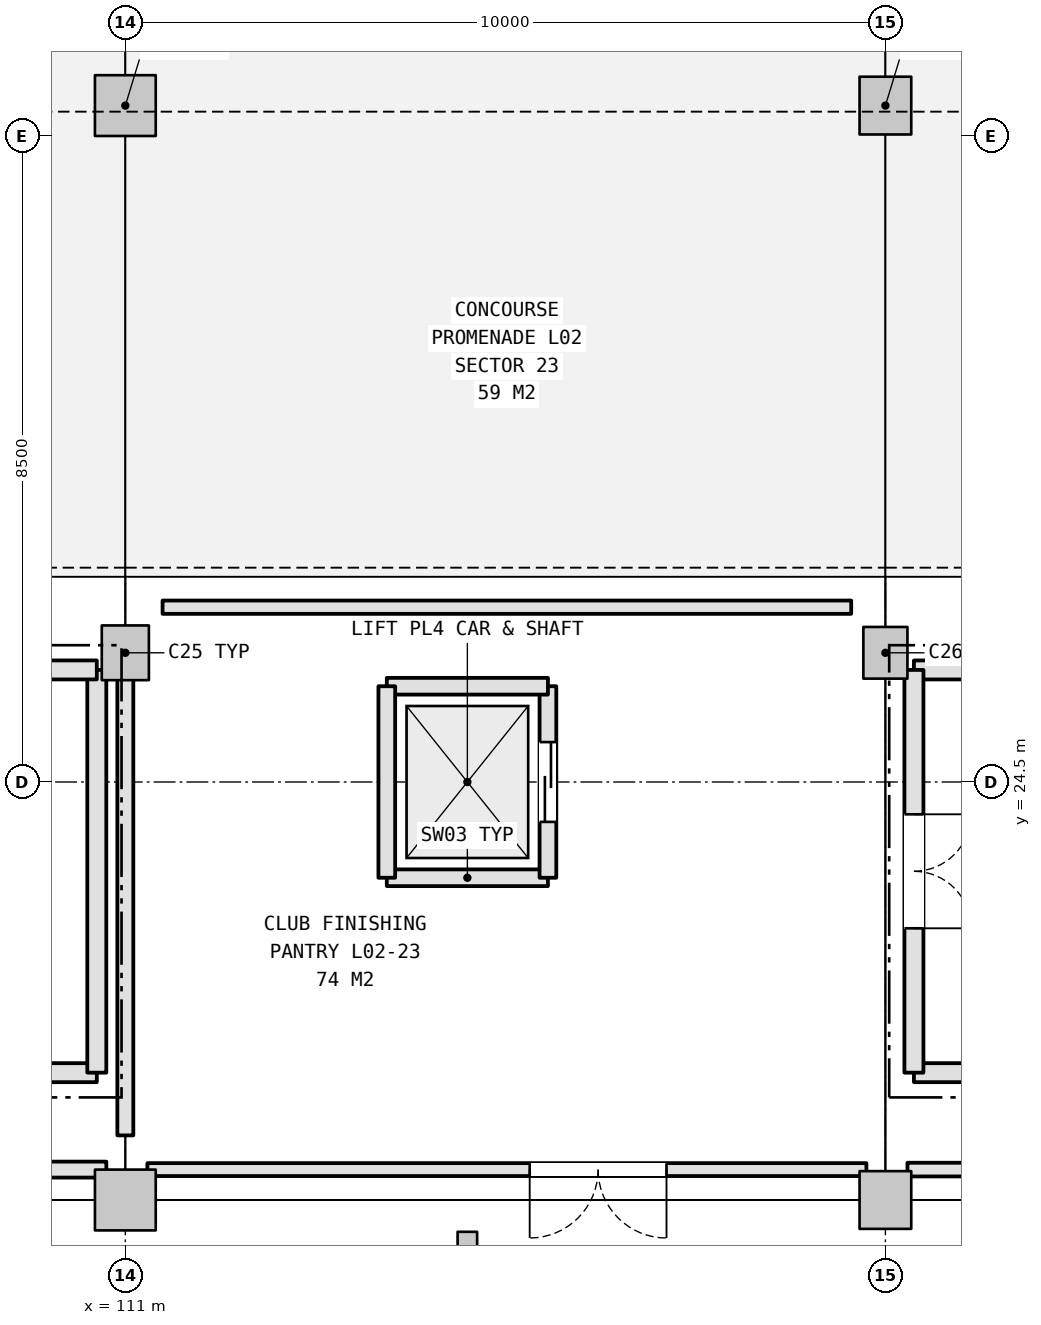
"""IFC4 building model, lengths in metres.
Left out: names, types, materials, properties, quantities, classifications, styles, units other than length and angle.
Written with IfcOpenShell. Run it as: python <this file> out.ifc"""

import sys

from ifc_helpers import new_model, si_unit, direction, frame, frame_2d, origin, origin_2d, place, context, subcontext, project, spatial, rectangle, i_section, extrude, element, fill, save


model = new_model("IFC4")
c1 = context("Model", 3, precision=1e-05, world=origin(), true_north=direction((0.0, 1.0)))
c2 = subcontext(c1, "Body", "Model", "MODEL_VIEW")
j1 = project(units=[si_unit("LENGTHUNIT", "METRE"), si_unit("PLANEANGLEUNIT", "RADIAN")], contexts=[c1])
p1 = place(None, origin())
s1 = spatial("IfcSite", under=j1, at=p1, CompositionType="ELEMENT")
p2 = place(p1, origin())
s2 = spatial("IfcBuilding", under=s1, at=p2, CompositionType="ELEMENT")
p3 = place(p2, frame((0.0, 0.0, 10.8)))
s3 = spatial("IfcBuildingStorey", under=s2, at=p3, CompositionType="ELEMENT", Elevation=10.8)
p4 = place(p3, frame((111.0, 33.4, 0.0), z_axis=(0.0, 0.0, 1.0), x_axis=(1.0, 0.0, 0.0)))
e1 = element("IfcColumn", 1, at=p4, inside=s3, PredefinedType="COLUMN", context=c2, shape_type="SweptSolid", body=[
    extrude(rectangle(XDim=0.8, YDim=0.8, at=origin_2d()), origin(), (0.0, 0.0, 1.0), 5.4),
])
p5 = place(p3, frame((111.0, 26.2, 0.0), z_axis=(0.0, 0.0, 1.0), x_axis=(1.0, 0.0, 0.0)))
e2 = element("IfcColumn", 2, at=p5, inside=s3, PredefinedType="COLUMN", context=c2, shape_type="SweptSolid", body=[
    extrude(rectangle(XDim=0.62, YDim=0.72, at=origin_2d()), origin(), (0.0, 0.0, 1.0), 5.4),
])
p6 = place(p3, frame((111.0, 19.0, 0.0), z_axis=(0.0, 0.0, 1.0), x_axis=(1.0, 0.0, 0.0)))
e3 = element("IfcColumn", 3, at=p6, inside=s3, PredefinedType="COLUMN", context=c2, shape_type="SweptSolid", body=[
    extrude(rectangle(XDim=0.8, YDim=0.8, at=origin_2d()), origin(), (0.0, 0.0, 1.0), 5.4),
])
p7 = place(p3, frame((121.0, 33.4, 0.0), z_axis=(0.0, 0.0, 1.0), x_axis=(1.0, 0.0, 0.0)))
e4 = element("IfcColumn", 4, at=p7, inside=s3, PredefinedType="COLUMN", context=c2, shape_type="SweptSolid", body=[
    extrude(rectangle(XDim=0.68, YDim=0.76, at=origin_2d()), origin(), (0.0, 0.0, 1.0), 5.4),
])
p8 = place(p3, frame((121.0, 26.2, 0.0), z_axis=(0.0, 0.0, 1.0), x_axis=(1.0, 0.0, 0.0)))
e5 = element("IfcColumn", 5, at=p8, inside=s3, PredefinedType="COLUMN", context=c2, shape_type="SweptSolid", body=[
    extrude(rectangle(XDim=0.58, YDim=0.68, at=origin_2d()), origin(), (0.0, 0.0, 1.0), 5.4),
])
p9 = place(p3, frame((121.0, 19.0, 0.0), z_axis=(0.0, 0.0, 1.0), x_axis=(1.0, 0.0, 0.0)))
e6 = element("IfcColumn", 6, at=p9, inside=s3, PredefinedType="COLUMN", context=c2, shape_type="SweptSolid", body=[
    extrude(rectangle(XDim=0.68, YDim=0.76, at=origin_2d()), origin(), (0.0, 0.0, 1.0), 5.4),
])
p10 = place(p3, frame((115.5, 18.4, 0.0), z_axis=(0.0, 0.0, 1.0), x_axis=(1.0, 0.0, 0.0)))
e7 = element("IfcColumn", 7, at=p10, inside=s3, PredefinedType="COLUMN", context=c2, shape_type="SweptSolid", body=[
    extrude(i_section(OverallWidth=0.257, OverallDepth=0.363, WebThickness=0.013, FlangeThickness=0.022, FilletRadius=0.015, at=origin_2d()), origin(), (0.0, 0.0, 1.0), 5.4),
])
for number, where, z_axis, x_axis in (
    (8, (121.375, 20.675, 0.0), (0.0, 0.0, 1.0), (1.0, 0.0, 0.0)),
    (9, (130.625, 25.975, 0.0), (0.0, 0.0, 1.0), (-1.0, 0.0, 0.0)),
):
    element("IfcWall", number, at=place(p3, frame(where, z_axis=z_axis, x_axis=x_axis)), inside=s3, PredefinedType="SHEAR", context=c2, shape_type="SweptSolid", body=[
        extrude(rectangle(XDim=9.249, YDim=0.25, at=frame_2d((4.625, 0.0))), origin(), (0.0, 0.0, 1.0), 5.15),
    ])
p11 = place(p3, frame((121.375, 25.975, 0.0), z_axis=(0.0, 0.0, 1.0), x_axis=(0.0, -1.0, 0.0)))
e10 = element("IfcWall", 10, at=p11, inside=s3, PredefinedType="SHEAR", context=c2, shape_type="SweptSolid", body=[
    extrude(rectangle(XDim=5.299, YDim=0.25, at=frame_2d((2.65, 0.0))), origin(), (0.0, 0.0, 1.0), 5.15),
])
p12 = place(p11, frame((1.9, 0.0, 0.0)))
e11 = element("IfcOpeningElement", 11, at=p12, cuts=e10, PredefinedType="OPENING", context=c2, shape_type="SweptSolid", body=[
    extrude(rectangle(XDim=1.5, YDim=2.2, at=frame_2d((0.75, 1.1))), frame((0.0, 0.135, 0.0), z_axis=(0.0, -1.0, 0.0), x_axis=(1.0, 0.0, 0.0)), (0.0, 0.0, 1.0), 0.27),
])
p13 = place(p3, frame((101.375, 20.675, 0.0), z_axis=(0.0, 0.0, 1.0), x_axis=(1.0, 0.0, 0.0)))
e12 = element("IfcWall", 12, at=p13, inside=s3, PredefinedType="SHEAR", context=c2, shape_type="SweptSolid", body=[
    extrude(rectangle(XDim=9.249, YDim=0.25, at=frame_2d((4.625, 0.0))), origin(), (0.0, 0.0, 1.0), 5.15),
])
p14 = place(p3, frame((110.625, 20.675, 0.0), z_axis=(0.0, 0.0, 1.0), x_axis=(0.0, 1.0, 0.0)))
e13 = element("IfcWall", 13, at=p14, inside=s3, PredefinedType="SHEAR", context=c2, shape_type="SweptSolid", body=[
    extrude(rectangle(XDim=5.299, YDim=0.25, at=frame_2d((2.65, 0.0))), origin(), (0.0, 0.0, 1.0), 5.15),
])
p15 = place(p3, frame((110.625, 25.975, 0.0), z_axis=(0.0, 0.0, 1.0), x_axis=(-1.0, 0.0, 0.0)))
e14 = element("IfcWall", 14, at=p15, inside=s3, PredefinedType="SHEAR", context=c2, shape_type="SweptSolid", body=[
    extrude(rectangle(XDim=9.249, YDim=0.25, at=frame_2d((4.625, 0.0))), origin(), (0.0, 0.0, 1.0), 5.15),
])
p16 = place(p3, frame((114.44, 23.24, 0.0), z_axis=(0.0, 0.0, 1.0), x_axis=(1.0, 0.0, 0.0)))
e15 = element("IfcWall", 15, at=p16, inside=s3, PredefinedType="SHEAR", context=c2, shape_type="SweptSolid", body=[
    extrude(rectangle(XDim=2.12, YDim=0.22, at=frame_2d((1.06, 0.0))), origin(), (0.0, 0.0, 1.0), 5.15),
])
p17 = place(p3, frame((116.56, 23.24, 0.0), z_axis=(0.0, 0.0, 1.0), x_axis=(0.0, 1.0, 0.0)))
e16 = element("IfcWall", 16, at=p17, inside=s3, PredefinedType="SHEAR", context=c2, shape_type="SweptSolid", body=[
    extrude(rectangle(XDim=2.52, YDim=0.22, at=frame_2d((1.26, 0.0))), origin(), (0.0, 0.0, 1.0), 5.15),
])
p18 = place(p17, frame((0.735, 0.0, 0.0)))
e17 = element("IfcOpeningElement", 17, at=p18, cuts=e16, PredefinedType="OPENING", context=c2, shape_type="SweptSolid", body=[
    extrude(rectangle(XDim=1.05, YDim=2.15, at=frame_2d((0.525, 1.075))), frame((0.0, 0.12, 0.0), z_axis=(0.0, -1.0, 0.0), x_axis=(1.0, 0.0, 0.0)), (0.0, 0.0, 1.0), 0.24),
])
p19 = place(p3, frame((116.56, 25.76, 0.0), z_axis=(0.0, 0.0, 1.0), x_axis=(-1.0, 0.0, 0.0)))
e18 = element("IfcWall", 18, at=p19, inside=s3, PredefinedType="SHEAR", context=c2, shape_type="SweptSolid", body=[
    extrude(rectangle(XDim=2.12, YDim=0.22, at=frame_2d((1.06, 0.0))), origin(), (0.0, 0.0, 1.0), 5.15),
])
p20 = place(p3, frame((114.44, 25.76, 0.0), z_axis=(0.0, 0.0, 1.0), x_axis=(0.0, -1.0, 0.0)))
e19 = element("IfcWall", 19, at=p20, inside=s3, PredefinedType="SHEAR", context=c2, shape_type="SweptSolid", body=[
    extrude(rectangle(XDim=2.52, YDim=0.22, at=frame_2d((1.26, 0.0))), origin(), (0.0, 0.0, 1.0), 5.15),
])
p21 = place(p3, frame((110.75, 19.4, 0.0), z_axis=(0.0, 0.0, 1.0), x_axis=(-1.0, 0.0, 0.0)))
e20 = element("IfcWall", 20, at=p21, inside=s3, PredefinedType="PLUMBINGWALL", context=c2, shape_type="SweptSolid", body=[
    extrude(rectangle(XDim=9.46, YDim=0.21, at=frame_2d((4.73, 0.0))), origin(), (0.0, 0.0, 1.0), 4.215),
])
p22 = place(p21, frame((7.47, 0.0, 0.0)))
e21 = element("IfcOpeningElement", 21, at=p22, cuts=e20, PredefinedType="OPENING", context=c2, shape_type="SweptSolid", body=[
    extrude(rectangle(XDim=0.92, YDim=2.1, at=frame_2d((0.46, 1.05))), frame((0.0, 0.115, 0.0), z_axis=(0.0, -1.0, 0.0), x_axis=(1.0, 0.0, 0.0)), (0.0, 0.0, 1.0), 0.23),
])
p23 = place(p3, frame((111.0, 26.35, 0.0), z_axis=(0.0, 0.0, 1.0), x_axis=(0.0, -1.0, 0.0)))
e22 = element("IfcWall", 22, at=p23, inside=s3, PredefinedType="PLUMBINGWALL", context=c2, shape_type="SweptSolid", body=[
    extrude(rectangle(XDim=6.5, YDim=0.21, at=frame_2d((3.25, 0.0))), origin(), (0.0, 0.0, 1.0), 4.255),
])
p24 = place(p3, frame((120.75, 19.4, 0.0), z_axis=(0.0, 0.0, 1.0), x_axis=(-1.0, 0.0, 0.0)))
e23 = element("IfcWall", 23, at=p24, inside=s3, PredefinedType="PARTITIONING", context=c2, shape_type="SweptSolid", body=[
    extrude(rectangle(XDim=9.46, YDim=0.17, at=frame_2d((4.73, 0.0))), origin(), (0.0, 0.0, 1.0), 4.255),
])
p25 = place(p24, frame((2.63, 0.0, 0.0)))
e24 = element("IfcOpeningElement", 24, at=p25, cuts=e23, PredefinedType="OPENING", context=c2, shape_type="SweptSolid", body=[
    extrude(rectangle(XDim=1.8, YDim=2.2, at=frame_2d((0.9, 1.1))), frame((0.0, 0.095, 0.0), z_axis=(0.0, -1.0, 0.0), x_axis=(1.0, 0.0, 0.0)), (0.0, 0.0, 1.0), 0.19),
])
p26 = place(p3, frame((111.49, 26.8, 0.0), z_axis=(0.0, 0.0, 1.0), x_axis=(1.0, 0.0, 0.0)))
e25 = element("IfcWall", 25, at=p26, inside=s3, PredefinedType="PARTITIONING", context=c2, shape_type="SweptSolid", body=[
    extrude(rectangle(XDim=9.06, YDim=0.175, at=frame_2d((4.53, 0.0))), origin(), (0.0, 0.0, 1.0), 5.12),
])
p27 = place(p3, frame((130.75, 19.4, 0.0), z_axis=(0.0, 0.0, 1.0), x_axis=(-1.0, 0.0, 0.0)))
e26 = element("IfcWall", 26, at=p27, inside=s3, PredefinedType="PARTITIONING", context=c2, shape_type="SweptSolid", body=[
    extrude(rectangle(XDim=9.46, YDim=0.18, at=frame_2d((4.73, 0.0))), origin(), (0.0, 0.0, 1.0), 4.215),
])
p28 = place(p27, frame((7.455, 0.0, 0.0)))
e27 = element("IfcOpeningElement", 27, at=p28, cuts=e26, PredefinedType="OPENING", context=c2, shape_type="SweptSolid", body=[
    extrude(rectangle(XDim=0.95, YDim=2.15, at=frame_2d((0.475, 1.075))), frame((0.0, 0.1, 0.0), z_axis=(0.0, -1.0, 0.0), x_axis=(1.0, 0.0, 0.0)), (0.0, 0.0, 1.0), 0.2),
])
p29 = place(p12, origin())
e28 = element("IfcDoor", 28, at=p29, inside=s3, OperationType="DOUBLE_DOOR_SINGLE_SWING", PredefinedType="DOOR", context=c2, shape_type="SweptSolid", body=[
    extrude(rectangle(XDim=1.5, YDim=2.2, at=frame_2d((0.75, 1.1))), frame((0.0, 0.025, 0.0), z_axis=(0.0, -1.0, 0.0), x_axis=(1.0, 0.0, 0.0)), (0.0, 0.0, 1.0), 0.05),
])
fill(e11, e28)
p30 = place(p18, origin())
e29 = element("IfcDoor", 29, at=p30, inside=s3, OperationType="DOUBLE_DOOR_SLIDING", PredefinedType="DOOR", context=c2, shape_type="SweptSolid", body=[
    extrude(rectangle(XDim=1.05, YDim=2.15, at=frame_2d((0.525, 1.075))), frame((0.0, 0.025, 0.0), z_axis=(0.0, -1.0, 0.0), x_axis=(1.0, 0.0, 0.0)), (0.0, 0.0, 1.0), 0.05),
])
fill(e17, e29)
p31 = place(p25, origin())
e30 = element("IfcDoor", 30, at=p31, inside=s3, OperationType="DOUBLE_DOOR_SINGLE_SWING", PredefinedType="DOOR", context=c2, shape_type="SweptSolid", body=[
    extrude(rectangle(XDim=1.8, YDim=2.2, at=frame_2d((0.9, 1.1))), frame((0.0, 0.025, 0.0), z_axis=(0.0, -1.0, 0.0), x_axis=(1.0, 0.0, 0.0)), (0.0, 0.0, 1.0), 0.05),
])
fill(e24, e30)
save(model, sys.argv[1])
